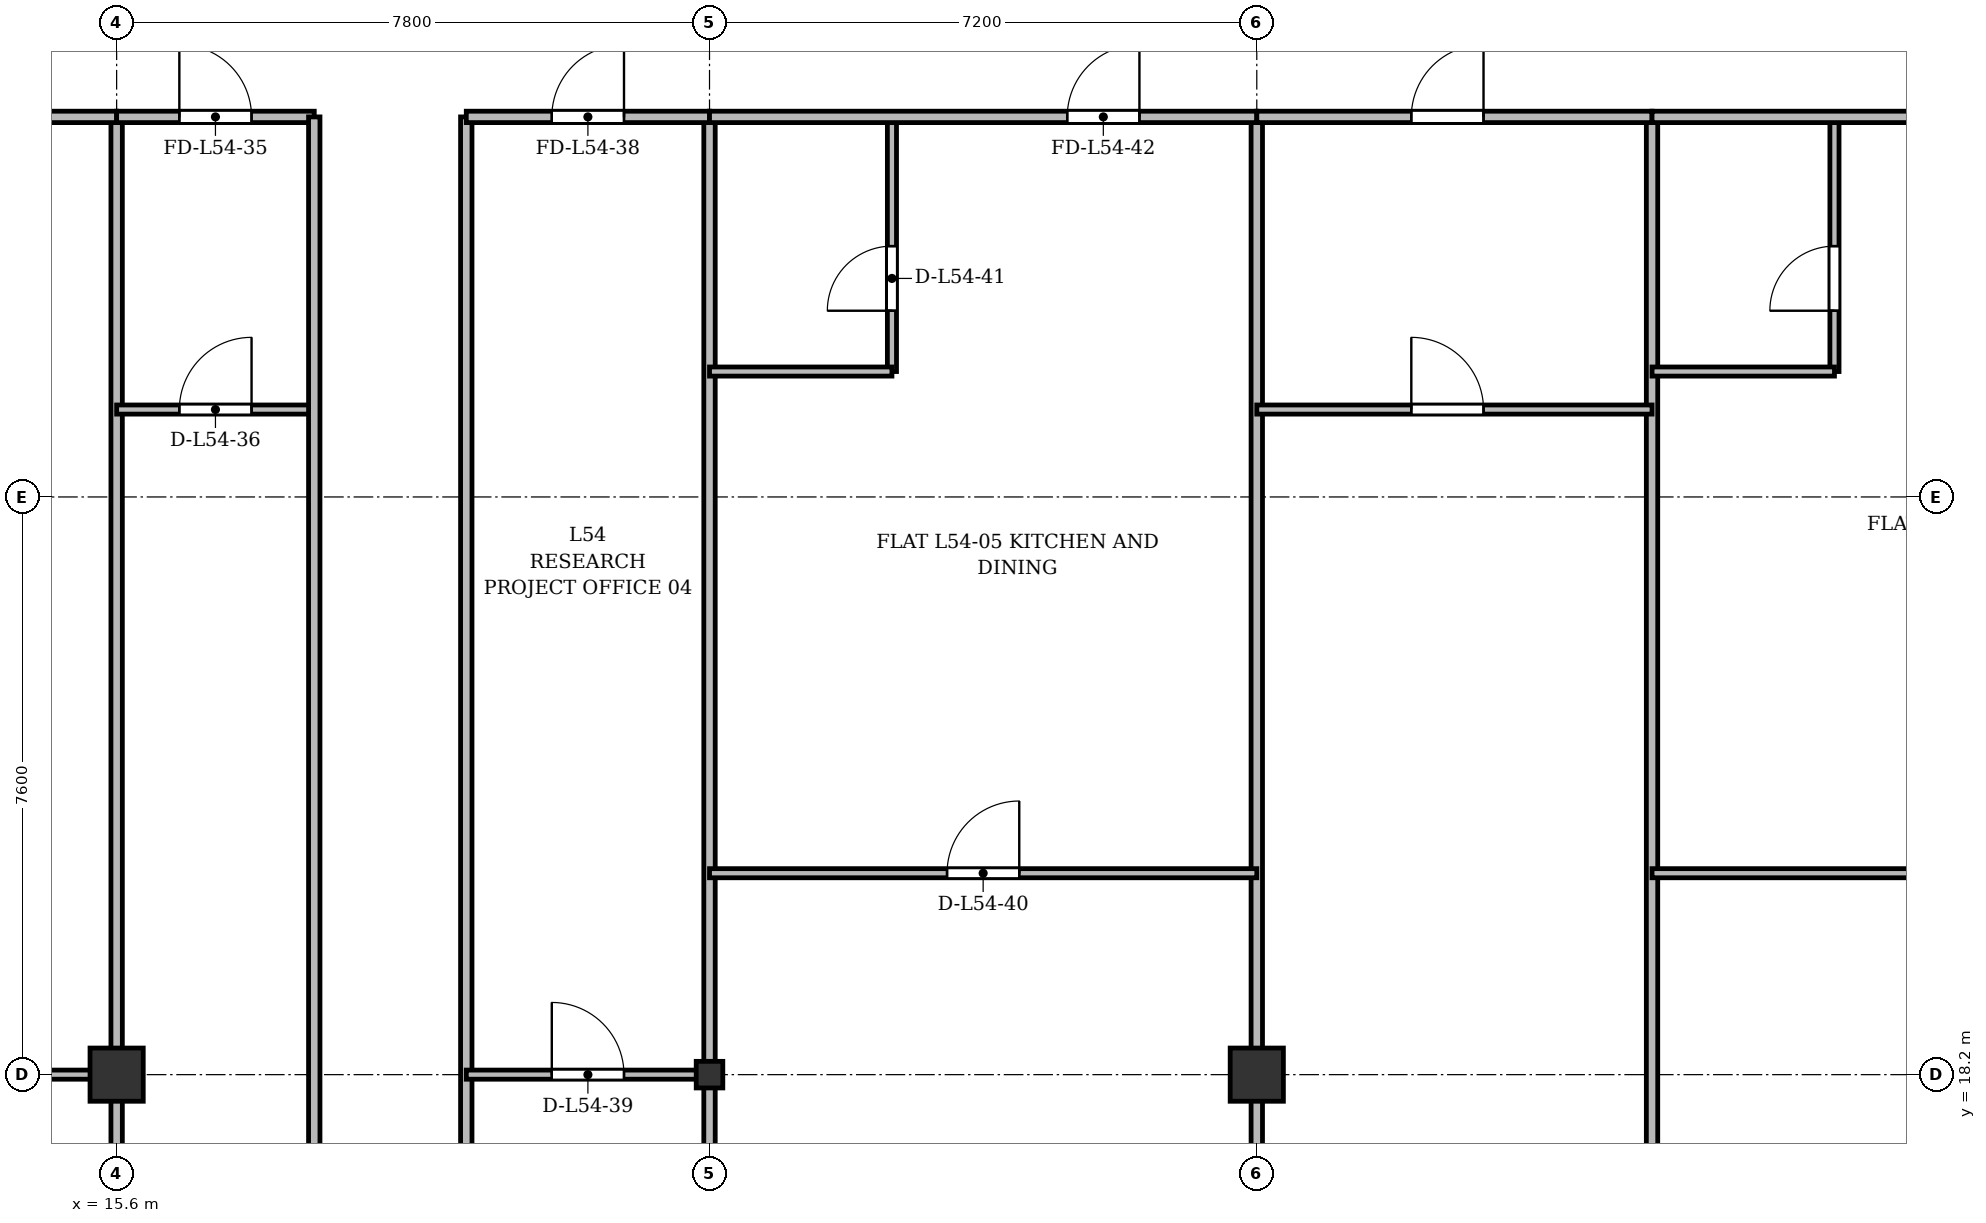
"""IFC4 building model, lengths in metres.
Left out: names, types, materials, properties, quantities, classifications, styles, units other than length and angle.
Written with IfcOpenShell. Run it as: python <this file> out.ifc"""

import sys

from ifc_helpers import new_model, si_unit, direction, frame, frame_2d, origin, origin_2d, place, context, subcontext, project, spatial, rectangle, i_section, extrude, source, transform, mapped, element, fill, save


model = new_model("IFC4")
c1 = context("Model", 3, precision=1e-05, world=origin(), true_north=direction((0.0, 1.0)))
c2 = subcontext(c1, "Body", "Model", "MODEL_VIEW")
j1 = project(units=[si_unit("LENGTHUNIT", "METRE"), si_unit("PLANEANGLEUNIT", "RADIAN")], contexts=[c1])
p1 = place(None, origin())
s1 = spatial("IfcSite", under=j1, at=p1, CompositionType="ELEMENT")
p2 = place(p1, origin())
s2 = spatial("IfcBuilding", under=s1, at=p2, CompositionType="ELEMENT")
p3 = place(p2, frame((0.0, 0.0, 208.5)))
s3 = spatial("IfcBuildingStorey", under=s2, at=p3, CompositionType="ELEMENT", Elevation=208.5)
m1 = source(origin(), c2, "Body", "SweptSolid", [
    extrude(rectangle(XDim=0.7, YDim=0.7, at=origin_2d()), origin(), (0.0, 0.0, 1.0), 3.6),
])
p4 = place(p3, frame((15.6, 18.2, 0.0), z_axis=(0.0, 0.0, 1.0), x_axis=(1.0, 0.0, 0.0)))
e1 = element("IfcColumn", 1, at=p4, inside=s3, PredefinedType="COLUMN", context=c2, shape_type="MappedRepresentation", body=[
    mapped(m1, transform((0.0, 0.0, 0.0), x_axis=(1.0, 0.0, 0.0), y_axis=(0.0, 1.0, 0.0), z_axis=(0.0, 0.0, 1.0), scale=1.0)),
])
m2 = source(origin(), c2, "Body", "SweptSolid", [
    extrude(i_section(OverallWidth=0.35, OverallDepth=0.35, WebThickness=0.018, FlangeThickness=0.028, at=origin_2d()), origin(), (0.0, 0.0, 1.0), 3.6),
])
p5 = place(p3, frame((23.4, 18.2, 0.0), z_axis=(0.0, 0.0, 1.0), x_axis=(1.0, 0.0, 0.0)))
e2 = element("IfcColumn", 2, at=p5, inside=s3, PredefinedType="COLUMN", context=c2, shape_type="MappedRepresentation", body=[
    mapped(m2, transform((0.0, 0.0, 0.0), x_axis=(1.0, 0.0, 0.0), y_axis=(0.0, 1.0, 0.0), z_axis=(0.0, 0.0, 1.0), scale=1.0)),
])
p6 = place(p3, frame((30.6, 18.2, 0.0), z_axis=(0.0, 0.0, 1.0), x_axis=(1.0, 0.0, 0.0)))
e3 = element("IfcColumn", 3, at=p6, inside=s3, PredefinedType="COLUMN", context=c2, shape_type="MappedRepresentation", body=[
    mapped(m1, transform((0.0, 0.0, 0.0), x_axis=(1.0, 0.0, 0.0), y_axis=(0.0, 1.0, 0.0), z_axis=(0.0, 0.0, 1.0), scale=1.0)),
])
for number, where, z_axis, x_axis in (
    (4, (15.6, 3.625, 0.0), (0.0, 0.0, 1.0), (0.0, 1.0, 0.0)),
    (5, (23.4, 3.625, 0.0), (0.0, 0.0, 1.0), (0.0, 1.0, 0.0)),
    (6, (30.6, 3.625, 0.0), (0.0, 0.0, 1.0), (0.0, 1.0, 0.0)),
):
    element("IfcWall", number, at=place(p3, frame(where, z_axis=z_axis, x_axis=x_axis)), inside=s3, PredefinedType="PARTITIONING", context=c2, shape_type="SweptSolid", body=[
        extrude(rectangle(XDim=27.175, YDim=0.15, at=frame_2d((13.587, 0.0))), origin(), (0.0, 0.0, 1.0), 2.86),
    ])
p7 = place(p3, frame((35.8, 3.625, 0.0), z_axis=(0.0, 0.0, 1.0), x_axis=(0.0, 1.0, 0.0)))
e7 = element("IfcWall", 7, at=p7, inside=s3, PredefinedType="PARTITIONING", context=c2, shape_type="SweptSolid", body=[
    extrude(rectangle(XDim=27.175, YDim=0.15, at=frame_2d((13.587, 0.0))), origin(), (0.0, 0.0, 1.0), 2.91),
])
p8 = place(p3, frame((8.24, 18.2, 0.0), z_axis=(0.0, 0.0, 1.0), x_axis=(1.0, 0.0, 0.0)))
e8 = element("IfcWall", 8, at=p8, inside=s3, PredefinedType="PARTITIONING", context=c2, shape_type="SweptSolid", body=[
    extrude(rectangle(XDim=7.36, YDim=0.12, at=frame_2d((3.68, 0.0))), origin(), (0.0, 0.0, 1.0), 2.91),
])
p9 = place(p8, frame((3.114, 0.0, 0.0)))
e9 = element("IfcOpeningElement", 9, at=p9, cuts=e8, PredefinedType="OPENING", context=c2, shape_type="SweptSolid", body=[
    extrude(rectangle(XDim=0.95, YDim=2.15, at=frame_2d((0.475, 1.075))), frame((0.0, 0.07, 0.0), z_axis=(0.0, -1.0, 0.0), x_axis=(1.0, 0.0, 0.0)), (0.0, 0.0, 1.0), 0.14),
])
p10 = place(p3, frame((8.225, 30.8, 0.0), z_axis=(0.0, 0.0, 1.0), x_axis=(1.0, 0.0, 0.0)))
e10 = element("IfcWall", 10, at=p10, inside=s3, PredefinedType="PARTITIONING", context=c2, shape_type="SweptSolid", body=[
    extrude(rectangle(XDim=7.375, YDim=0.15, at=frame_2d((3.688, 0.0))), origin(), (0.0, 0.0, 1.0), 2.86),
])
p11 = place(p10, frame((4.877, 0.0, 0.0)))
e11 = element("IfcOpeningElement", 11, at=p11, cuts=e10, PredefinedType="OPENING", context=c2, shape_type="SweptSolid", body=[
    extrude(rectangle(XDim=0.95, YDim=2.15, at=frame_2d((0.475, 1.075))), frame((0.0, 0.085, 0.0), z_axis=(0.0, -1.0, 0.0), x_axis=(1.0, 0.0, 0.0)), (0.0, 0.0, 1.0), 0.17),
])
p12 = place(p3, frame((15.6, 30.8, 0.0), z_axis=(0.0, 0.0, 1.0), x_axis=(1.0, 0.0, 0.0)))
e12 = element("IfcWall", 12, at=p12, inside=s3, PredefinedType="PARTITIONING", context=c2, shape_type="SweptSolid", body=[
    extrude(rectangle(XDim=2.6, YDim=0.15, at=frame_2d((1.3, 0.0))), origin(), (0.0, 0.0, 1.0), 2.86),
])
p13 = place(p12, frame((0.825, 0.0, 0.0)))
e13 = element("IfcOpeningElement", 13, at=p13, cuts=e12, PredefinedType="OPENING", context=c2, shape_type="SweptSolid", body=[
    extrude(rectangle(XDim=0.95, YDim=2.15, at=frame_2d((0.475, 1.075))), frame((0.0, 0.085, 0.0), z_axis=(0.0, -1.0, 0.0), x_axis=(1.0, 0.0, 0.0)), (0.0, 0.0, 1.0), 0.17),
])
p14 = place(p3, frame((15.6, 26.95, 0.0), z_axis=(0.0, 0.0, 1.0), x_axis=(1.0, 0.0, 0.0)))
e14 = element("IfcWall", 14, at=p14, inside=s3, PredefinedType="PARTITIONING", context=c2, shape_type="SweptSolid", body=[
    extrude(rectangle(XDim=2.6, YDim=0.12, at=frame_2d((1.3, 0.0))), origin(), (0.0, 0.0, 1.0), 2.86),
])
p15 = place(p14, frame((0.825, 0.0, 0.0)))
e15 = element("IfcOpeningElement", 15, at=p15, cuts=e14, PredefinedType="OPENING", context=c2, shape_type="SweptSolid", body=[
    extrude(rectangle(XDim=0.95, YDim=2.15, at=frame_2d((0.475, 1.075))), frame((0.0, 0.07, 0.0), z_axis=(0.0, -1.0, 0.0), x_axis=(1.0, 0.0, 0.0)), (0.0, 0.0, 1.0), 0.14),
])
for number, where, z_axis, x_axis in (
    (16, (18.2, 3.625, 0.0), (0.0, 0.0, 1.0), (0.0, 1.0, 0.0)),
    (17, (20.2, 3.625, 0.0), (0.0, 0.0, 1.0), (0.0, 1.0, 0.0)),
):
    element("IfcWall", number, at=place(p3, frame(where, z_axis=z_axis, x_axis=x_axis)), inside=s3, PredefinedType="PARTITIONING", context=c2, shape_type="SweptSolid", body=[
        extrude(rectangle(XDim=27.175, YDim=0.15, at=frame_2d((13.587, 0.0))), origin(), (0.0, 0.0, 1.0), 2.91),
    ])
p16 = place(p3, frame((20.2, 30.8, 0.0), z_axis=(0.0, 0.0, 1.0), x_axis=(1.0, 0.0, 0.0)))
e18 = element("IfcWall", 18, at=p16, inside=s3, PredefinedType="PARTITIONING", context=c2, shape_type="SweptSolid", body=[
    extrude(rectangle(XDim=3.2, YDim=0.15, at=frame_2d((1.6, 0.0))), origin(), (0.0, 0.0, 1.0), 2.86),
])
p17 = place(p16, frame((1.125, 0.0, 0.0)))
e19 = element("IfcOpeningElement", 19, at=p17, cuts=e18, PredefinedType="OPENING", context=c2, shape_type="SweptSolid", body=[
    extrude(rectangle(XDim=0.95, YDim=2.15, at=frame_2d((0.475, 1.075))), frame((0.0, 0.085, 0.0), z_axis=(0.0, -1.0, 0.0), x_axis=(1.0, 0.0, 0.0)), (0.0, 0.0, 1.0), 0.17),
])
p18 = place(p3, frame((20.2, 18.2, 0.0), z_axis=(0.0, 0.0, 1.0), x_axis=(1.0, 0.0, 0.0)))
e20 = element("IfcWall", 20, at=p18, inside=s3, PredefinedType="PARTITIONING", context=c2, shape_type="SweptSolid", body=[
    extrude(rectangle(XDim=3.2, YDim=0.12, at=frame_2d((1.6, 0.0))), origin(), (0.0, 0.0, 1.0), 2.91),
])
p19 = place(p18, frame((1.125, 0.0, 0.0)))
e21 = element("IfcOpeningElement", 21, at=p19, cuts=e20, PredefinedType="OPENING", context=c2, shape_type="SweptSolid", body=[
    extrude(rectangle(XDim=0.95, YDim=2.15, at=frame_2d((0.475, 1.075))), frame((0.0, 0.07, 0.0), z_axis=(0.0, -1.0, 0.0), x_axis=(1.0, 0.0, 0.0)), (0.0, 0.0, 1.0), 0.14),
])
p20 = place(p3, frame((23.4, 20.85, 0.0), z_axis=(0.0, 0.0, 1.0), x_axis=(1.0, 0.0, 0.0)))
e22 = element("IfcWall", 22, at=p20, inside=s3, PredefinedType="PARTITIONING", context=c2, shape_type="SweptSolid", body=[
    extrude(rectangle(XDim=7.2, YDim=0.12, at=frame_2d((3.6, 0.0))), origin(), (0.0, 0.0, 1.0), 2.86),
])
p21 = place(p20, frame((3.125, 0.0, 0.0)))
e23 = element("IfcOpeningElement", 23, at=p21, cuts=e22, PredefinedType="OPENING", context=c2, shape_type="SweptSolid", body=[
    extrude(rectangle(XDim=0.95, YDim=2.15, at=frame_2d((0.475, 1.075))), frame((0.0, 0.07, 0.0), z_axis=(0.0, -1.0, 0.0), x_axis=(1.0, 0.0, 0.0)), (0.0, 0.0, 1.0), 0.14),
])
p22 = place(p3, frame((25.8, 27.45, 0.0), z_axis=(0.0, 0.0, 1.0), x_axis=(0.0, 1.0, 0.0)))
e24 = element("IfcWall", 24, at=p22, inside=s3, PredefinedType="PARTITIONING", context=c2, shape_type="SweptSolid", body=[
    extrude(rectangle(XDim=3.35, YDim=0.12, at=frame_2d((1.675, 0.0))), origin(), (0.0, 0.0, 1.0), 3.36),
])
p23 = place(p22, frame((0.8, 0.0, 0.0)))
e25 = element("IfcOpeningElement", 25, at=p23, cuts=e24, PredefinedType="OPENING", context=c2, shape_type="SweptSolid", body=[
    extrude(rectangle(XDim=0.85, YDim=2.1, at=frame_2d((0.425, 1.05))), frame((0.0, 0.07, 0.0), z_axis=(0.0, -1.0, 0.0), x_axis=(1.0, 0.0, 0.0)), (0.0, 0.0, 1.0), 0.14),
])
p24 = place(p3, frame((23.4, 27.45, 0.0), z_axis=(0.0, 0.0, 1.0), x_axis=(1.0, 0.0, 0.0)))
e26 = element("IfcWall", 26, at=p24, inside=s3, PredefinedType="PARTITIONING", context=c2, shape_type="SweptSolid", body=[
    extrude(rectangle(XDim=2.4, YDim=0.12, at=frame_2d((1.2, 0.0))), origin(), (0.0, 0.0, 1.0), 2.86),
])
p25 = place(p3, frame((23.4, 30.8, 0.0), z_axis=(0.0, 0.0, 1.0), x_axis=(1.0, 0.0, 0.0)))
e27 = element("IfcWall", 27, at=p25, inside=s3, PredefinedType="PARTITIONING", context=c2, shape_type="SweptSolid", body=[
    extrude(rectangle(XDim=7.2, YDim=0.15, at=frame_2d((3.6, 0.0))), origin(), (0.0, 0.0, 1.0), 2.86),
])
p26 = place(p25, frame((4.706, 0.0, 0.0)))
e28 = element("IfcOpeningElement", 28, at=p26, cuts=e27, PredefinedType="OPENING", context=c2, shape_type="SweptSolid", body=[
    extrude(rectangle(XDim=0.95, YDim=2.15, at=frame_2d((0.475, 1.075))), frame((0.0, 0.085, 0.0), z_axis=(0.0, -1.0, 0.0), x_axis=(1.0, 0.0, 0.0)), (0.0, 0.0, 1.0), 0.17),
])
p27 = place(p3, frame((30.6, 30.8, 0.0), z_axis=(0.0, 0.0, 1.0), x_axis=(1.0, 0.0, 0.0)))
e29 = element("IfcWall", 29, at=p27, inside=s3, PredefinedType="PARTITIONING", context=c2, shape_type="SweptSolid", body=[
    extrude(rectangle(XDim=5.2, YDim=0.15, at=frame_2d((2.6, 0.0))), origin(), (0.0, 0.0, 1.0), 2.86),
])
p28 = place(p27, frame((2.033, 0.0, 0.0)))
e30 = element("IfcOpeningElement", 30, at=p28, cuts=e29, PredefinedType="OPENING", context=c2, shape_type="SweptSolid", body=[
    extrude(rectangle(XDim=0.95, YDim=2.15, at=frame_2d((0.475, 1.075))), frame((0.0, 0.085, 0.0), z_axis=(0.0, -1.0, 0.0), x_axis=(1.0, 0.0, 0.0)), (0.0, 0.0, 1.0), 0.17),
])
p29 = place(p3, frame((30.6, 26.95, 0.0), z_axis=(0.0, 0.0, 1.0), x_axis=(1.0, 0.0, 0.0)))
e31 = element("IfcWall", 31, at=p29, inside=s3, PredefinedType="PARTITIONING", context=c2, shape_type="SweptSolid", body=[
    extrude(rectangle(XDim=5.2, YDim=0.12, at=frame_2d((2.6, 0.0))), origin(), (0.0, 0.0, 1.0), 2.86),
])
p30 = place(p29, frame((2.033, 0.0, 0.0)))
e32 = element("IfcOpeningElement", 32, at=p30, cuts=e31, PredefinedType="OPENING", context=c2, shape_type="SweptSolid", body=[
    extrude(rectangle(XDim=0.95, YDim=2.15, at=frame_2d((0.475, 1.075))), frame((0.0, 0.07, 0.0), z_axis=(0.0, -1.0, 0.0), x_axis=(1.0, 0.0, 0.0)), (0.0, 0.0, 1.0), 0.14),
])
p31 = place(p3, frame((35.8, 20.85, 0.0), z_axis=(0.0, 0.0, 1.0), x_axis=(1.0, 0.0, 0.0)))
e33 = element("IfcWall", 33, at=p31, inside=s3, PredefinedType="PARTITIONING", context=c2, shape_type="SweptSolid", body=[
    extrude(rectangle(XDim=8.0, YDim=0.12, at=frame_2d((4.0, 0.0))), origin(), (0.0, 0.0, 1.0), 2.86),
])
p32 = place(p31, frame((3.525, 0.0, 0.0)))
e34 = element("IfcOpeningElement", 34, at=p32, cuts=e33, PredefinedType="OPENING", context=c2, shape_type="SweptSolid", body=[
    extrude(rectangle(XDim=0.95, YDim=2.15, at=frame_2d((0.475, 1.075))), frame((0.0, 0.07, 0.0), z_axis=(0.0, -1.0, 0.0), x_axis=(1.0, 0.0, 0.0)), (0.0, 0.0, 1.0), 0.14),
])
p33 = place(p3, frame((38.2, 27.45, 0.0), z_axis=(0.0, 0.0, 1.0), x_axis=(0.0, 1.0, 0.0)))
e35 = element("IfcWall", 35, at=p33, inside=s3, PredefinedType="PARTITIONING", context=c2, shape_type="SweptSolid", body=[
    extrude(rectangle(XDim=3.35, YDim=0.12, at=frame_2d((1.675, 0.0))), origin(), (0.0, 0.0, 1.0), 3.36),
])
p34 = place(p33, frame((0.8, 0.0, 0.0)))
e36 = element("IfcOpeningElement", 36, at=p34, cuts=e35, PredefinedType="OPENING", context=c2, shape_type="SweptSolid", body=[
    extrude(rectangle(XDim=0.85, YDim=2.1, at=frame_2d((0.425, 1.05))), frame((0.0, 0.07, 0.0), z_axis=(0.0, -1.0, 0.0), x_axis=(1.0, 0.0, 0.0)), (0.0, 0.0, 1.0), 0.14),
])
p35 = place(p3, frame((35.8, 27.45, 0.0), z_axis=(0.0, 0.0, 1.0), x_axis=(1.0, 0.0, 0.0)))
e37 = element("IfcWall", 37, at=p35, inside=s3, PredefinedType="PARTITIONING", context=c2, shape_type="SweptSolid", body=[
    extrude(rectangle(XDim=2.4, YDim=0.12, at=frame_2d((1.2, 0.0))), origin(), (0.0, 0.0, 1.0), 3.36),
])
p36 = place(p3, frame((35.8, 30.8, 0.0), z_axis=(0.0, 0.0, 1.0), x_axis=(1.0, 0.0, 0.0)))
e38 = element("IfcWall", 38, at=p36, inside=s3, PredefinedType="PARTITIONING", context=c2, shape_type="SweptSolid", body=[
    extrude(rectangle(XDim=8.0, YDim=0.15, at=frame_2d((4.0, 0.0))), origin(), (0.0, 0.0, 1.0), 2.86),
])
p37 = place(p36, frame((5.367, 0.0, 0.0)))
e39 = element("IfcOpeningElement", 39, at=p37, cuts=e38, PredefinedType="OPENING", context=c2, shape_type="SweptSolid", body=[
    extrude(rectangle(XDim=0.95, YDim=2.15, at=frame_2d((0.475, 1.075))), frame((0.0, 0.085, 0.0), z_axis=(0.0, -1.0, 0.0), x_axis=(1.0, 0.0, 0.0)), (0.0, 0.0, 1.0), 0.17),
])
m3 = source(origin(), c2, "Body", "SweptSolid", [
    extrude(rectangle(XDim=0.95, YDim=2.15, at=frame_2d((0.475, 1.075))), frame((0.0, 0.025, 0.0), z_axis=(0.0, -1.0, 0.0), x_axis=(1.0, 0.0, 0.0)), (0.0, 0.0, 1.0), 0.05),
])
p38 = place(p13, origin())
e40 = element("IfcDoor", 40, at=p38, inside=s3, OperationType="SINGLE_SWING_LEFT", PredefinedType="DOOR", context=c2, shape_type="MappedRepresentation", body=[
    mapped(m3, transform((0.0, 0.0, 0.0), x_axis=(1.0, 0.0, 0.0), y_axis=(0.0, 1.0, 0.0), z_axis=(0.0, 0.0, 1.0), scale=1.0)),
])
fill(e13, e40)
p39 = place(p15, origin())
e41 = element("IfcDoor", 41, at=p39, inside=s3, OperationType="SINGLE_SWING_RIGHT", PredefinedType="DOOR", context=c2, shape_type="MappedRepresentation", body=[
    mapped(m3, transform((0.0, 0.0, 0.0), x_axis=(1.0, 0.0, 0.0), y_axis=(0.0, 1.0, 0.0), z_axis=(0.0, 0.0, 1.0), scale=1.0)),
])
fill(e15, e41)
p40 = place(p17, origin())
e42 = element("IfcDoor", 42, at=p40, inside=s3, OperationType="SINGLE_SWING_RIGHT", PredefinedType="DOOR", context=c2, shape_type="MappedRepresentation", body=[
    mapped(m3, transform((0.0, 0.0, 0.0), x_axis=(1.0, 0.0, 0.0), y_axis=(0.0, 1.0, 0.0), z_axis=(0.0, 0.0, 1.0), scale=1.0)),
])
fill(e19, e42)
p41 = place(p19, origin())
e43 = element("IfcDoor", 43, at=p41, inside=s3, OperationType="SINGLE_SWING_LEFT", PredefinedType="DOOR", context=c2, shape_type="MappedRepresentation", body=[
    mapped(m3, transform((0.0, 0.0, 0.0), x_axis=(1.0, 0.0, 0.0), y_axis=(0.0, 1.0, 0.0), z_axis=(0.0, 0.0, 1.0), scale=1.0)),
])
fill(e21, e43)
p42 = place(p21, origin())
e44 = element("IfcDoor", 44, at=p42, inside=s3, OperationType="SINGLE_SWING_RIGHT", PredefinedType="DOOR", context=c2, shape_type="MappedRepresentation", body=[
    mapped(m3, transform((0.0, 0.0, 0.0), x_axis=(1.0, 0.0, 0.0), y_axis=(0.0, 1.0, 0.0), z_axis=(0.0, 0.0, 1.0), scale=1.0)),
])
fill(e23, e44)
m4 = source(origin(), c2, "Body", "SweptSolid", [
    extrude(rectangle(XDim=0.85, YDim=2.1, at=frame_2d((0.425, 1.05))), frame((0.0, 0.025, 0.0), z_axis=(0.0, -1.0, 0.0), x_axis=(1.0, 0.0, 0.0)), (0.0, 0.0, 1.0), 0.05),
])
p43 = place(p23, origin())
e45 = element("IfcDoor", 45, at=p43, inside=s3, OperationType="SINGLE_SWING_LEFT", PredefinedType="DOOR", context=c2, shape_type="MappedRepresentation", body=[
    mapped(m4, transform((0.0, 0.0, 0.0), x_axis=(1.0, 0.0, 0.0), y_axis=(0.0, 1.0, 0.0), z_axis=(0.0, 0.0, 1.0), scale=1.0)),
])
fill(e25, e45)
p44 = place(p26, origin())
e46 = element("IfcDoor", 46, at=p44, inside=s3, OperationType="SINGLE_SWING_RIGHT", PredefinedType="DOOR", context=c2, shape_type="MappedRepresentation", body=[
    mapped(m3, transform((0.0, 0.0, 0.0), x_axis=(1.0, 0.0, 0.0), y_axis=(0.0, 1.0, 0.0), z_axis=(0.0, 0.0, 1.0), scale=1.0)),
])
fill(e28, e46)
p45 = place(p28, origin())
e47 = element("IfcDoor", 47, at=p45, inside=s3, OperationType="SINGLE_SWING_RIGHT", PredefinedType="DOOR", context=c2, shape_type="MappedRepresentation", body=[
    mapped(m3, transform((0.0, 0.0, 0.0), x_axis=(1.0, 0.0, 0.0), y_axis=(0.0, 1.0, 0.0), z_axis=(0.0, 0.0, 1.0), scale=1.0)),
])
fill(e30, e47)
p46 = place(p30, origin())
e48 = element("IfcDoor", 48, at=p46, inside=s3, OperationType="SINGLE_SWING_LEFT", PredefinedType="DOOR", context=c2, shape_type="MappedRepresentation", body=[
    mapped(m3, transform((0.0, 0.0, 0.0), x_axis=(1.0, 0.0, 0.0), y_axis=(0.0, 1.0, 0.0), z_axis=(0.0, 0.0, 1.0), scale=1.0)),
])
fill(e32, e48)
p47 = place(p34, origin())
e49 = element("IfcDoor", 49, at=p47, inside=s3, OperationType="SINGLE_SWING_LEFT", PredefinedType="DOOR", context=c2, shape_type="MappedRepresentation", body=[
    mapped(m4, transform((0.0, 0.0, 0.0), x_axis=(1.0, 0.0, 0.0), y_axis=(0.0, 1.0, 0.0), z_axis=(0.0, 0.0, 1.0), scale=1.0)),
])
fill(e36, e49)
save(model, sys.argv[1])
